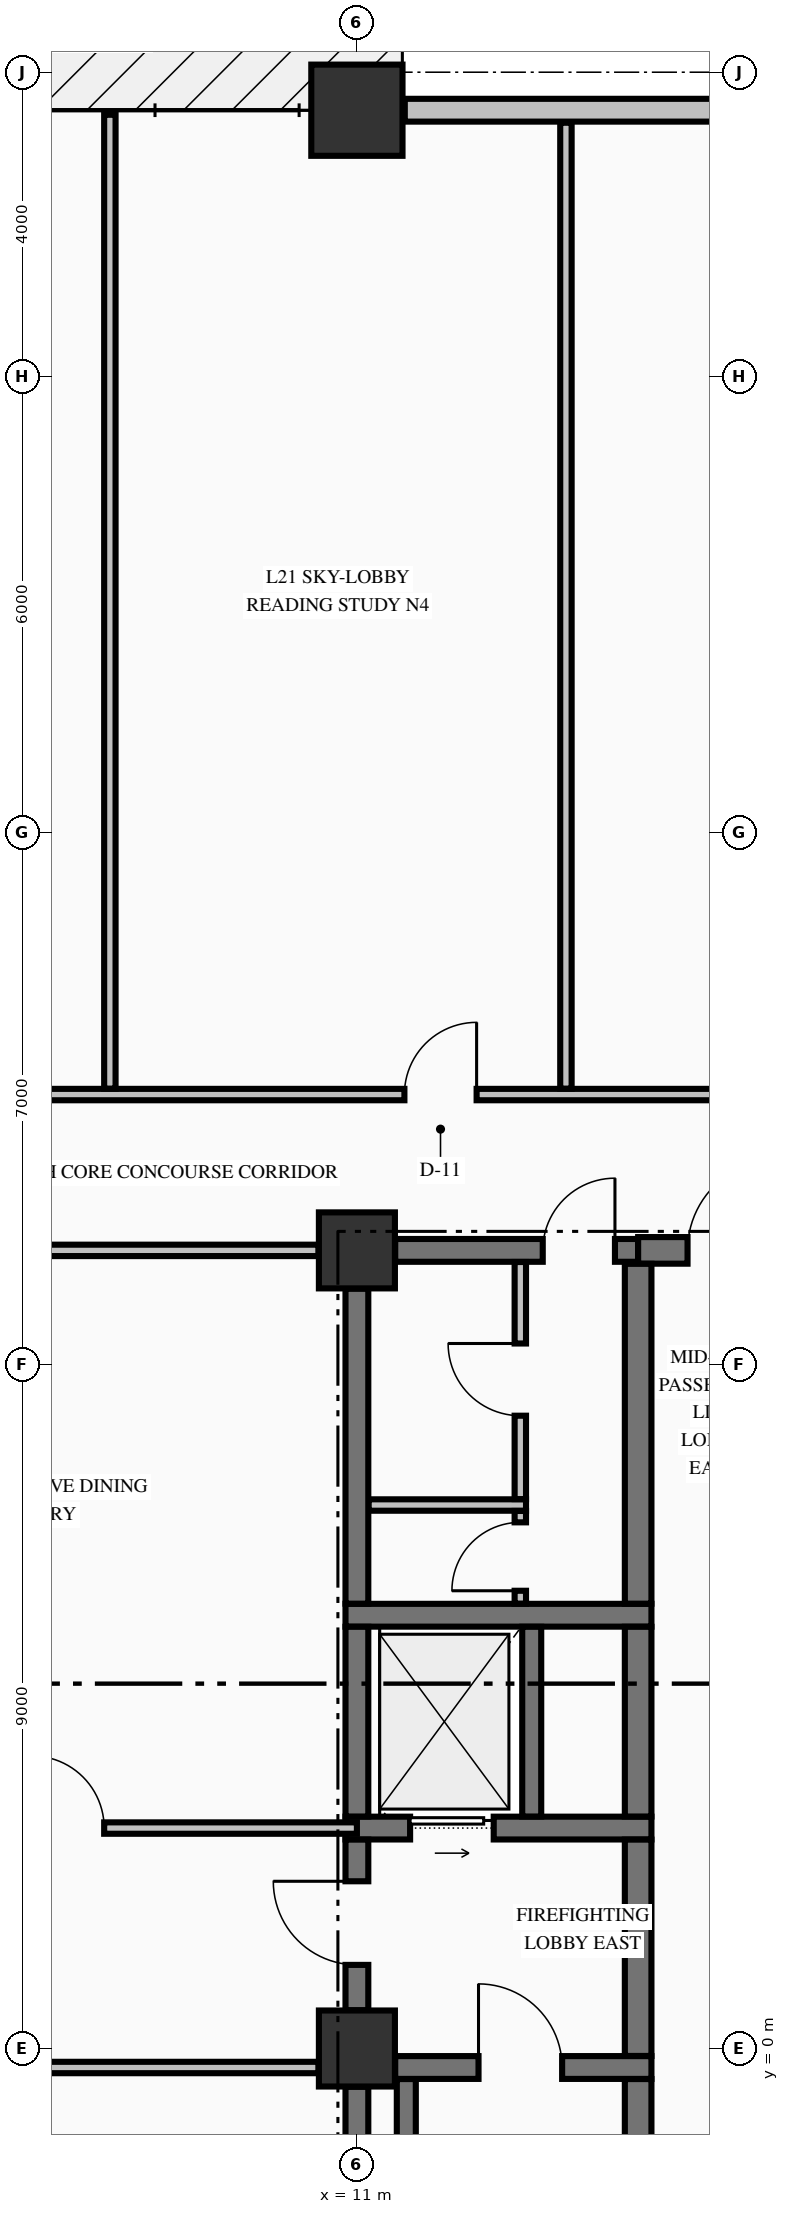
"""IFC4 building model, lengths in metres.
Left out: names, types, materials, properties, quantities, classifications, styles, units other than length and angle.
Written with IfcOpenShell. Run it as: python <this file> out.ifc"""

import sys

from ifc_helpers import new_model, si_unit, direction, frame, frame_2d, origin, origin_2d, place, context, subcontext, project, spatial, rectangle, extrude, element, fill, save


model = new_model("IFC4")
c1 = context("Model", 3, precision=1e-05, world=origin(), true_north=direction((0.0, 1.0)))
c2 = subcontext(c1, "Body", "Model", "MODEL_VIEW")
j1 = project(units=[si_unit("LENGTHUNIT", "METRE"), si_unit("PLANEANGLEUNIT", "RADIAN")], contexts=[c1])
p1 = place(None, origin())
s1 = spatial("IfcSite", under=j1, at=p1, CompositionType="ELEMENT")
p2 = place(p1, origin())
s2 = spatial("IfcBuilding", under=s1, at=p2, CompositionType="ELEMENT")
p3 = place(p2, frame((0.0, 0.0, 86.94)))
s3 = spatial("IfcBuildingStorey", under=s2, at=p3, CompositionType="ELEMENT", Elevation=86.94)
p4 = place(p3, frame((11.0, 25.5, -0.425), z_axis=(0.0, 0.0, 1.0), x_axis=(1.0, 0.0, 0.0)))
e1 = element("IfcColumn", 1, at=p4, inside=s3, PredefinedType="COLUMN", context=c2, shape_type="SweptSolid", body=[
    extrude(rectangle(XDim=1.2, YDim=1.2, at=origin_2d()), origin(), (0.0, 0.0, 1.0), 4.595),
])
for number, where, z_axis, x_axis in (
    (2, (11.0, 0.0, -0.425), (0.0, 0.0, 1.0), (1.0, 0.0, 0.0)),
    (3, (11.0, 10.5, -0.425), (0.0, 0.0, 1.0), (1.0, 0.0, 0.0)),
):
    element("IfcColumn", number, at=place(p3, frame(where, z_axis=z_axis, x_axis=x_axis)), inside=s3, PredefinedType="COLUMN", context=c2, shape_type="SweptSolid", body=[
        extrude(rectangle(XDim=1.0, YDim=1.0, at=origin_2d()), origin(), (0.0, 0.0, 1.0), 4.595),
    ])
p5 = place(p3, frame((22.87, 25.5, 0.0), z_axis=(0.0, 0.0, 1.0), x_axis=(-1.0, 0.0, 0.0)))
e4 = element("IfcWall", 4, at=p5, inside=s3, PredefinedType="STANDARD", context=c2, shape_type="SweptSolid", body=[
    extrude(rectangle(XDim=11.24, YDim=0.3, at=frame_2d((5.62, 0.0))), origin(), (0.0, 0.0, 1.0), 1.962),
])
p6 = place(p3, frame((11.504, -0.25, 0.0), z_axis=(0.0, 0.0, 1.0), x_axis=(1.0, 0.0, 0.0)))
e5 = element("IfcWall", 5, at=p6, inside=s3, PredefinedType="SHEAR", context=c2, shape_type="SweptSolid", body=[
    extrude(rectangle(XDim=3.371, YDim=0.3, at=frame_2d((1.686, 0.0))), origin(), (0.0, 0.0, 1.0), 4.17),
])
p7 = place(p6, frame((1.096, 0.0, 0.0)))
e6 = element("IfcOpeningElement", 6, at=p7, cuts=e5, PredefinedType="OPENING", context=c2, shape_type="SweptSolid", body=[
    extrude(rectangle(XDim=1.1, YDim=2.15, at=frame_2d((0.55, 1.075))), frame((0.0, 0.16, 0.0), z_axis=(0.0, -1.0, 0.0), x_axis=(1.0, 0.0, 0.0)), (0.0, 0.0, 1.0), 0.32),
])
p8 = place(p3, frame((10.85, 2.9, 0.0), z_axis=(0.0, 0.0, 1.0), x_axis=(1.0, 0.0, 0.0)))
e7 = element("IfcWall", 7, at=p8, inside=s3, PredefinedType="SHEAR", context=c2, shape_type="SweptSolid", body=[
    extrude(rectangle(XDim=4.025, YDim=0.3, at=frame_2d((2.012, 0.0))), origin(), (0.0, 0.0, 1.0), 4.17),
])
p9 = place(p8, frame((0.85, 0.0, 0.0)))
e8 = element("IfcOpeningElement", 8, at=p9, cuts=e7, PredefinedType="OPENING", context=c2, shape_type="SweptSolid", body=[
    extrude(rectangle(XDim=1.1, YDim=2.2, at=frame_2d((0.55, 1.1))), frame((0.0, 0.16, 0.0), z_axis=(0.0, -1.0, 0.0), x_axis=(1.0, 0.0, 0.0)), (0.0, 0.0, 1.0), 0.32),
])
p10 = place(p3, frame((10.85, 5.7, 0.0), z_axis=(0.0, 0.0, 1.0), x_axis=(1.0, 0.0, 0.0)))
e9 = element("IfcWall", 9, at=p10, inside=s3, PredefinedType="SHEAR", context=c2, shape_type="SweptSolid", body=[
    extrude(rectangle(XDim=4.025, YDim=0.3, at=frame_2d((2.012, 0.0))), origin(), (0.0, 0.0, 1.0), 4.17),
])
p11 = place(p3, frame((11.504, 10.5, 0.0), z_axis=(0.0, 0.0, 1.0), x_axis=(1.0, 0.0, 0.0)))
e10 = element("IfcWall", 10, at=p11, inside=s3, PredefinedType="SHEAR", context=c2, shape_type="SweptSolid", body=[
    extrude(rectangle(XDim=3.196, YDim=0.3, at=frame_2d((1.598, 0.0))), origin(), (0.0, 0.0, 1.0), 4.17),
])
p12 = place(p11, frame((1.941, 0.0, 0.0)))
e11 = element("IfcOpeningElement", 11, at=p12, cuts=e10, PredefinedType="OPENING", context=c2, shape_type="SweptSolid", body=[
    extrude(rectangle(XDim=0.95, YDim=2.15, at=frame_2d((0.475, 1.075))), frame((0.0, 0.16, 0.0), z_axis=(0.0, -1.0, 0.0), x_axis=(1.0, 0.0, 0.0)), (0.0, 0.0, 1.0), 0.32),
])
p13 = place(p3, frame((14.7, 10.5, 0.0), z_axis=(0.0, 0.0, 1.0), x_axis=(1.0, 0.0, 0.0)))
e12 = element("IfcWall", 12, at=p13, inside=s3, PredefinedType="SHEAR", context=c2, shape_type="SweptSolid", body=[
    extrude(rectangle(XDim=4.796, YDim=0.35, at=frame_2d((2.398, 0.0))), origin(), (0.0, 0.0, 1.0), 4.17),
])
p14 = place(p13, frame((0.65, 0.0, 0.0)))
e13 = element("IfcOpeningElement", 13, at=p14, cuts=e12, PredefinedType="OPENING", context=c2, shape_type="SweptSolid", body=[
    extrude(rectangle(XDim=1.2, YDim=2.15, at=frame_2d((0.6, 1.075))), frame((0.0, 0.185, 0.0), z_axis=(0.0, -1.0, 0.0), x_axis=(1.0, 0.0, 0.0)), (0.0, 0.0, 1.0), 0.37),
])
p15 = place(p13, frame((3.225, 0.0, 0.0)))
e14 = element("IfcOpeningElement", 14, at=p15, cuts=e12, PredefinedType="OPENING", context=c2, shape_type="SweptSolid", body=[
    extrude(rectangle(XDim=0.95, YDim=2.15, at=frame_2d((0.475, 1.075))), frame((0.0, 0.185, 0.0), z_axis=(0.0, -1.0, 0.0), x_axis=(1.0, 0.0, 0.0)), (0.0, 0.0, 1.0), 0.37),
])
p16 = place(p3, frame((-10.494, -0.25, 0.0), z_axis=(0.0, 0.0, 1.0), x_axis=(1.0, 0.0, 0.0)))
e15 = element("IfcWall", 15, at=p16, inside=s3, PredefinedType="PARTITIONING", context=c2, shape_type="SweptSolid", body=[
    extrude(rectangle(XDim=20.988, YDim=0.15, at=frame_2d((10.494, 0.0))), origin(), (0.0, 0.0, 1.0), 4.17),
])
p17 = place(p16, frame((6.944, 0.0, 0.0)))
e16 = element("IfcOpeningElement", 16, at=p17, cuts=e15, PredefinedType="OPENING", context=c2, shape_type="SweptSolid", body=[
    extrude(rectangle(XDim=1.1, YDim=2.15, at=frame_2d((0.55, 1.075))), frame((0.0, 0.085, 0.0), z_axis=(0.0, -1.0, 0.0), x_axis=(1.0, 0.0, 0.0)), (0.0, 0.0, 1.0), 0.17),
])
p18 = place(p16, frame((2.419, 0.0, 0.0)))
e17 = element("IfcOpeningElement", 17, at=p18, cuts=e15, PredefinedType="OPENING", context=c2, shape_type="SweptSolid", body=[
    extrude(rectangle(XDim=1.05, YDim=2.15, at=frame_2d((0.525, 1.075))), frame((0.0, 0.085, 0.0), z_axis=(0.0, -1.0, 0.0), x_axis=(1.0, 0.0, 0.0)), (0.0, 0.0, 1.0), 0.17),
])
p19 = place(p16, frame((14.569, 0.0, 0.0)))
e18 = element("IfcOpeningElement", 18, at=p19, cuts=e15, PredefinedType="OPENING", context=c2, shape_type="SweptSolid", body=[
    extrude(rectangle(XDim=0.95, YDim=2.15, at=frame_2d((0.475, 1.075))), frame((0.0, 0.085, 0.0), z_axis=(0.0, -1.0, 0.0), x_axis=(1.0, 0.0, 0.0)), (0.0, 0.0, 1.0), 0.17),
])
p20 = place(p3, frame((-11.0, 2.9, 0.0), z_axis=(0.0, 0.0, 1.0), x_axis=(1.0, 0.0, 0.0)))
e19 = element("IfcWall", 19, at=p20, inside=s3, PredefinedType="PARTITIONING", context=c2, shape_type="SweptSolid", body=[
    extrude(rectangle(XDim=22.0, YDim=0.15, at=frame_2d((11.0, 0.0))), origin(), (0.0, 0.0, 1.0), 4.17),
])
p21 = place(p20, frame((7.45, 0.0, 0.0)))
e20 = element("IfcOpeningElement", 20, at=p21, cuts=e19, PredefinedType="OPENING", context=c2, shape_type="SweptSolid", body=[
    extrude(rectangle(XDim=1.1, YDim=2.15, at=frame_2d((0.55, 1.075))), frame((0.0, 0.085, 0.0), z_axis=(0.0, -1.0, 0.0), x_axis=(1.0, 0.0, 0.0)), (0.0, 0.0, 1.0), 0.17),
])
p22 = place(p20, frame((2.925, 0.0, 0.0)))
e21 = element("IfcOpeningElement", 21, at=p22, cuts=e19, PredefinedType="OPENING", context=c2, shape_type="SweptSolid", body=[
    extrude(rectangle(XDim=1.05, YDim=2.15, at=frame_2d((0.525, 1.075))), frame((0.0, 0.085, 0.0), z_axis=(0.0, -1.0, 0.0), x_axis=(1.0, 0.0, 0.0)), (0.0, 0.0, 1.0), 0.17),
])
p23 = place(p20, frame((11.275, 0.0, 0.0)))
e22 = element("IfcOpeningElement", 22, at=p23, cuts=e19, PredefinedType="OPENING", context=c2, shape_type="SweptSolid", body=[
    extrude(rectangle(XDim=0.95, YDim=2.15, at=frame_2d((0.475, 1.075))), frame((0.0, 0.085, 0.0), z_axis=(0.0, -1.0, 0.0), x_axis=(1.0, 0.0, 0.0)), (0.0, 0.0, 1.0), 0.17),
])
p24 = place(p20, frame((17.725, 0.0, 0.0)))
e23 = element("IfcOpeningElement", 23, at=p24, cuts=e19, PredefinedType="OPENING", context=c2, shape_type="SweptSolid", body=[
    extrude(rectangle(XDim=0.95, YDim=2.15, at=frame_2d((0.475, 1.075))), frame((0.0, 0.085, 0.0), z_axis=(0.0, -1.0, 0.0), x_axis=(1.0, 0.0, 0.0)), (0.0, 0.0, 1.0), 0.17),
])
p25 = place(p3, frame((11.153, 7.15, 0.0), z_axis=(0.0, 0.0, 1.0), x_axis=(1.0, 0.0, 0.0)))
e24 = element("IfcWall", 24, at=p25, inside=s3, PredefinedType="PARTITIONING", context=c2, shape_type="SweptSolid", body=[
    extrude(rectangle(XDim=2.072, YDim=0.15, at=frame_2d((1.036, 0.0))), origin(), (0.0, 0.0, 1.0), 4.17),
])
p26 = place(p3, frame((-10.494, 10.5, 0.0), z_axis=(0.0, 0.0, 1.0), x_axis=(1.0, 0.0, 0.0)))
e25 = element("IfcWall", 25, at=p26, inside=s3, PredefinedType="PARTITIONING", context=c2, shape_type="SweptSolid", body=[
    extrude(rectangle(XDim=20.988, YDim=0.15, at=frame_2d((10.494, 0.0))), origin(), (0.0, 0.0, 1.0), 4.17),
])
p27 = place(p26, frame((6.944, 0.0, 0.0)))
e26 = element("IfcOpeningElement", 26, at=p27, cuts=e25, PredefinedType="OPENING", context=c2, shape_type="SweptSolid", body=[
    extrude(rectangle(XDim=1.1, YDim=2.15, at=frame_2d((0.55, 1.075))), frame((0.0, 0.085, 0.0), z_axis=(0.0, -1.0, 0.0), x_axis=(1.0, 0.0, 0.0)), (0.0, 0.0, 1.0), 0.17),
])
p28 = place(p3, frame((-22.835, 12.55, 0.0), z_axis=(0.0, 0.0, 1.0), x_axis=(1.0, 0.0, 0.0)))
e27 = element("IfcWall", 27, at=p28, inside=s3, PredefinedType="PARTITIONING", context=c2, shape_type="SweptSolid", body=[
    extrude(rectangle(XDim=50.67, YDim=0.15, at=frame_2d((25.335, 0.0))), origin(), (0.0, 0.0, 1.0), 4.17),
])
p29 = place(p28, frame((8.93, 0.0, 0.0)))
e28 = element("IfcOpeningElement", 28, at=p29, cuts=e27, PredefinedType="OPENING", context=c2, shape_type="SweptSolid", body=[
    extrude(rectangle(XDim=1.05, YDim=2.15, at=frame_2d((0.525, 1.075))), frame((0.0, 0.085, 0.0), z_axis=(0.0, -1.0, 0.0), x_axis=(1.0, 0.0, 0.0)), (0.0, 0.0, 1.0), 0.17),
])
p30 = place(p28, frame((18.66, 0.0, 0.0)))
e29 = element("IfcOpeningElement", 29, at=p30, cuts=e27, PredefinedType="OPENING", context=c2, shape_type="SweptSolid", body=[
    extrude(rectangle(XDim=1.05, YDim=2.15, at=frame_2d((0.525, 1.075))), frame((0.0, 0.085, 0.0), z_axis=(0.0, -1.0, 0.0), x_axis=(1.0, 0.0, 0.0)), (0.0, 0.0, 1.0), 0.17),
])
p31 = place(p28, frame((26.71, 0.0, 0.0)))
e30 = element("IfcOpeningElement", 30, at=p31, cuts=e27, PredefinedType="OPENING", context=c2, shape_type="SweptSolid", body=[
    extrude(rectangle(XDim=0.95, YDim=2.15, at=frame_2d((0.475, 1.075))), frame((0.0, 0.085, 0.0), z_axis=(0.0, -1.0, 0.0), x_axis=(1.0, 0.0, 0.0)), (0.0, 0.0, 1.0), 0.17),
])
p32 = place(p28, frame((34.46, 0.0, 0.0)))
e31 = element("IfcOpeningElement", 31, at=p32, cuts=e27, PredefinedType="OPENING", context=c2, shape_type="SweptSolid", body=[
    extrude(rectangle(XDim=0.95, YDim=2.15, at=frame_2d((0.475, 1.075))), frame((0.0, 0.085, 0.0), z_axis=(0.0, -1.0, 0.0), x_axis=(1.0, 0.0, 0.0)), (0.0, 0.0, 1.0), 0.17),
])
p33 = place(p28, frame((39.08, 0.0, 0.0)))
e32 = element("IfcOpeningElement", 32, at=p33, cuts=e27, PredefinedType="OPENING", context=c2, shape_type="SweptSolid", body=[
    extrude(rectangle(XDim=1.05, YDim=2.15, at=frame_2d((0.525, 1.075))), frame((0.0, 0.085, 0.0), z_axis=(0.0, -1.0, 0.0), x_axis=(1.0, 0.0, 0.0)), (0.0, 0.0, 1.0), 0.17),
])
p34 = place(p3, frame((11.0, -9.446, 0.0), z_axis=(0.0, 0.0, 1.0), x_axis=(0.0, 1.0, 0.0)))
e33 = element("IfcWall", 33, at=p34, inside=s3, PredefinedType="SHEAR", context=c2, shape_type="SweptSolid", body=[
    extrude(rectangle(XDim=8.942, YDim=0.3, at=frame_2d((4.471, 0.0))), origin(), (0.0, 0.0, 1.0), 4.17),
])
p35 = place(p3, frame((11.0, 0.504, 0.0), z_axis=(0.0, 0.0, 1.0), x_axis=(0.0, 1.0, 0.0)))
e34 = element("IfcWall", 34, at=p35, inside=s3, PredefinedType="SHEAR", context=c2, shape_type="SweptSolid", body=[
    extrude(rectangle(XDim=2.244, YDim=0.3, at=frame_2d((1.122, 0.0))), origin(), (0.0, 0.0, 1.0), 4.17),
])
p36 = place(p35, frame((0.596, 0.0, 0.0)))
e35 = element("IfcOpeningElement", 35, at=p36, cuts=e34, PredefinedType="OPENING", context=c2, shape_type="SweptSolid", body=[
    extrude(rectangle(XDim=1.1, YDim=2.15, at=frame_2d((0.55, 1.075))), frame((0.0, 0.16, 0.0), z_axis=(0.0, -1.0, 0.0), x_axis=(1.0, 0.0, 0.0)), (0.0, 0.0, 1.0), 0.32),
])
p37 = place(p3, frame((11.0, 3.052, 0.0), z_axis=(0.0, 0.0, 1.0), x_axis=(0.0, 1.0, 0.0)))
e36 = element("IfcWall", 36, at=p37, inside=s3, PredefinedType="SHEAR", context=c2, shape_type="SweptSolid", body=[
    extrude(rectangle(XDim=2.496, YDim=0.3, at=frame_2d((1.248, 0.0))), origin(), (0.0, 0.0, 1.0), 4.17),
])
p38 = place(p3, frame((11.0, 5.852, 0.0), z_axis=(0.0, 0.0, 1.0), x_axis=(0.0, 1.0, 0.0)))
e37 = element("IfcWall", 37, at=p38, inside=s3, PredefinedType="SHEAR", context=c2, shape_type="SweptSolid", body=[
    extrude(rectangle(XDim=4.144, YDim=0.3, at=frame_2d((2.072, 0.0))), origin(), (0.0, 0.0, 1.0), 4.17),
])
p39 = place(p3, frame((11.65, -9.798, 0.0), z_axis=(0.0, 0.0, 1.0), x_axis=(0.0, 1.0, 0.0)))
e38 = element("IfcWall", 38, at=p39, inside=s3, PredefinedType="SOLIDWALL", context=c2, shape_type="SweptSolid", body=[
    extrude(rectangle(XDim=9.396, YDim=0.25, at=frame_2d((4.698, 0.0))), origin(), (0.0, 0.0, 1.0), 4.17),
])
p40 = place(p3, frame((13.3, 3.052, 0.0), z_axis=(0.0, 0.0, 1.0), x_axis=(0.0, 1.0, 0.0)))
e39 = element("IfcWall", 39, at=p40, inside=s3, PredefinedType="SOLIDWALL", context=c2, shape_type="SweptSolid", body=[
    extrude(rectangle(XDim=2.496, YDim=0.25, at=frame_2d((1.248, 0.0))), origin(), (0.0, 0.0, 1.0), 4.17),
])
p41 = place(p3, frame((14.7, -9.773, 0.0), z_axis=(0.0, 0.0, 1.0), x_axis=(0.0, 1.0, 0.0)))
e40 = element("IfcWall", 40, at=p41, inside=s3, PredefinedType="SHEAR", context=c2, shape_type="SweptSolid", body=[
    extrude(rectangle(XDim=9.371, YDim=0.35, at=frame_2d((4.686, 0.0))), origin(), (0.0, 0.0, 1.0), 4.17),
])
p42 = place(p3, frame((14.7, -0.098, 0.0), z_axis=(0.0, 0.0, 1.0), x_axis=(0.0, 1.0, 0.0)))
e41 = element("IfcWall", 41, at=p42, inside=s3, PredefinedType="SHEAR", context=c2, shape_type="SweptSolid", body=[
    extrude(rectangle(XDim=2.846, YDim=0.35, at=frame_2d((1.423, 0.0))), origin(), (0.0, 0.0, 1.0), 4.17),
])
p43 = place(p3, frame((14.7, 3.052, 0.0), z_axis=(0.0, 0.0, 1.0), x_axis=(0.0, 1.0, 0.0)))
e42 = element("IfcWall", 42, at=p43, inside=s3, PredefinedType="SHEAR", context=c2, shape_type="SweptSolid", body=[
    extrude(rectangle(XDim=2.496, YDim=0.35, at=frame_2d((1.248, 0.0))), origin(), (0.0, 0.0, 1.0), 4.17),
])
p44 = place(p3, frame((14.7, 5.852, 0.0), z_axis=(0.0, 0.0, 1.0), x_axis=(0.0, 1.0, 0.0)))
e43 = element("IfcWall", 43, at=p44, inside=s3, PredefinedType="SHEAR", context=c2, shape_type="SweptSolid", body=[
    extrude(rectangle(XDim=4.471, YDim=0.35, at=frame_2d((2.235, 0.0))), origin(), (0.0, 0.0, 1.0), 4.17),
])
p45 = place(p3, frame((7.75, 12.628, 0.0), z_axis=(0.0, 0.0, 1.0), x_axis=(0.0, 1.0, 0.0)))
e44 = element("IfcWall", 44, at=p45, inside=s3, PredefinedType="PARTITIONING", context=c2, shape_type="SweptSolid", body=[
    extrude(rectangle(XDim=12.812, YDim=0.15, at=frame_2d((6.406, 0.0))), origin(), (0.0, 0.0, 1.0), 4.17),
])
p46 = place(p3, frame((13.15, 5.853, 0.0), z_axis=(0.0, 0.0, 1.0), x_axis=(0.0, 1.0, 0.0)))
e45 = element("IfcWall", 45, at=p46, inside=s3, PredefinedType="PARTITIONING", context=c2, shape_type="SweptSolid", body=[
    extrude(rectangle(XDim=1.219, YDim=0.15, at=frame_2d((0.609, 0.0))), origin(), (0.0, 0.0, 1.0), 4.17),
])
p47 = place(p46, frame((0.169, 0.0, 0.0)))
e46 = element("IfcOpeningElement", 46, at=p47, cuts=e45, PredefinedType="OPENING", context=c2, shape_type="SweptSolid", body=[
    extrude(rectangle(XDim=0.9, YDim=2.15, at=frame_2d((0.45, 1.075))), frame((0.0, 0.085, 0.0), z_axis=(0.0, -1.0, 0.0), x_axis=(1.0, 0.0, 0.0)), (0.0, 0.0, 1.0), 0.17),
])
p48 = place(p3, frame((13.15, 7.228, 0.0), z_axis=(0.0, 0.0, 1.0), x_axis=(0.0, 1.0, 0.0)))
e47 = element("IfcWall", 47, at=p48, inside=s3, PredefinedType="PARTITIONING", context=c2, shape_type="SweptSolid", body=[
    extrude(rectangle(XDim=3.119, YDim=0.15, at=frame_2d((1.56, 0.0))), origin(), (0.0, 0.0, 1.0), 4.17),
])
p49 = place(p48, frame((1.097, 0.0, 0.0)))
e48 = element("IfcOpeningElement", 48, at=p49, cuts=e47, PredefinedType="OPENING", context=c2, shape_type="SweptSolid", body=[
    extrude(rectangle(XDim=0.95, YDim=2.15, at=frame_2d((0.475, 1.075))), frame((0.0, 0.085, 0.0), z_axis=(0.0, -1.0, 0.0), x_axis=(1.0, 0.0, 0.0)), (0.0, 0.0, 1.0), 0.17),
])
p50 = place(p3, frame((13.75, 12.628, 0.0), z_axis=(0.0, 0.0, 1.0), x_axis=(0.0, 1.0, 0.0)))
e49 = element("IfcWall", 49, at=p50, inside=s3, PredefinedType="PARTITIONING", context=c2, shape_type="SweptSolid", body=[
    extrude(rectangle(XDim=12.707, YDim=0.15, at=frame_2d((6.354, 0.0))), origin(), (0.0, 0.0, 1.0), 4.17),
])
p51 = place(p7, origin())
e50 = element("IfcDoor", 50, at=p51, inside=s3, OperationType="SINGLE_SWING_LEFT", PredefinedType="DOOR", context=c2, shape_type="SweptSolid", body=[
    extrude(rectangle(XDim=1.1, YDim=2.15, at=frame_2d((0.55, 1.075))), frame((0.0, 0.025, 0.0), z_axis=(0.0, -1.0, 0.0), x_axis=(1.0, 0.0, 0.0)), (0.0, 0.0, 1.0), 0.05),
])
fill(e6, e50)
p52 = place(p36, origin())
e51 = element("IfcDoor", 51, at=p52, inside=s3, OperationType="SINGLE_SWING_RIGHT", PredefinedType="DOOR", context=c2, shape_type="SweptSolid", body=[
    extrude(rectangle(XDim=1.1, YDim=2.15, at=frame_2d((0.55, 1.075))), frame((0.0, 0.025, 0.0), z_axis=(0.0, -1.0, 0.0), x_axis=(1.0, 0.0, 0.0)), (0.0, 0.0, 1.0), 0.05),
])
fill(e35, e51)
p53 = place(p9, origin())
e52 = element("IfcDoor", 52, at=p53, inside=s3, OperationType="SLIDING_TO_RIGHT", PredefinedType="DOOR", context=c2, shape_type="SweptSolid", body=[
    extrude(rectangle(XDim=1.1, YDim=2.2, at=frame_2d((0.55, 1.1))), frame((0.0, 0.025, 0.0), z_axis=(0.0, -1.0, 0.0), x_axis=(1.0, 0.0, 0.0)), (0.0, 0.0, 1.0), 0.05),
])
fill(e8, e52)
p54 = place(p12, origin())
e53 = element("IfcDoor", 53, at=p54, inside=s3, OperationType="SINGLE_SWING_RIGHT", PredefinedType="DOOR", context=c2, shape_type="SweptSolid", body=[
    extrude(rectangle(XDim=0.95, YDim=2.15, at=frame_2d((0.475, 1.075))), frame((0.0, 0.025, 0.0), z_axis=(0.0, -1.0, 0.0), x_axis=(1.0, 0.0, 0.0)), (0.0, 0.0, 1.0), 0.05),
])
fill(e11, e53)
p55 = place(p47, origin())
e54 = element("IfcDoor", 54, at=p55, inside=s3, OperationType="SINGLE_SWING_LEFT", PredefinedType="DOOR", context=c2, shape_type="SweptSolid", body=[
    extrude(rectangle(XDim=0.9, YDim=2.15, at=frame_2d((0.45, 1.075))), frame((0.0, 0.025, 0.0), z_axis=(0.0, -1.0, 0.0), x_axis=(1.0, 0.0, 0.0)), (0.0, 0.0, 1.0), 0.05),
])
fill(e46, e54)
p56 = place(p49, origin())
e55 = element("IfcDoor", 55, at=p56, inside=s3, OperationType="SINGLE_SWING_RIGHT", PredefinedType="DOOR", context=c2, shape_type="SweptSolid", body=[
    extrude(rectangle(XDim=0.95, YDim=2.15, at=frame_2d((0.475, 1.075))), frame((0.0, 0.025, 0.0), z_axis=(0.0, -1.0, 0.0), x_axis=(1.0, 0.0, 0.0)), (0.0, 0.0, 1.0), 0.05),
])
fill(e48, e55)
p57 = place(p14, origin())
e56 = element("IfcDoor", 56, at=p57, inside=s3, OperationType="SINGLE_SWING_RIGHT", PredefinedType="DOOR", context=c2, shape_type="SweptSolid", body=[
    extrude(rectangle(XDim=1.2, YDim=2.15, at=frame_2d((0.6, 1.075))), frame((0.0, 0.025, 0.0), z_axis=(0.0, -1.0, 0.0), x_axis=(1.0, 0.0, 0.0)), (0.0, 0.0, 1.0), 0.05),
])
fill(e13, e56)
p58 = place(p32, origin())
e57 = element("IfcDoor", 57, at=p58, inside=s3, OperationType="SINGLE_SWING_RIGHT", PredefinedType="DOOR", context=c2, shape_type="SweptSolid", body=[
    extrude(rectangle(XDim=0.95, YDim=2.15, at=frame_2d((0.475, 1.075))), frame((0.0, 0.025, 0.0), z_axis=(0.0, -1.0, 0.0), x_axis=(1.0, 0.0, 0.0)), (0.0, 0.0, 1.0), 0.05),
])
fill(e31, e57)
p59 = place(p24, origin())
e58 = element("IfcDoor", 58, at=p59, inside=s3, OperationType="SINGLE_SWING_LEFT", PredefinedType="DOOR", context=c2, shape_type="SweptSolid", body=[
    extrude(rectangle(XDim=0.95, YDim=2.15, at=frame_2d((0.475, 1.075))), frame((0.0, 0.025, 0.0), z_axis=(0.0, -1.0, 0.0), x_axis=(1.0, 0.0, 0.0)), (0.0, 0.0, 1.0), 0.05),
])
fill(e23, e58)
save(model, sys.argv[1])
